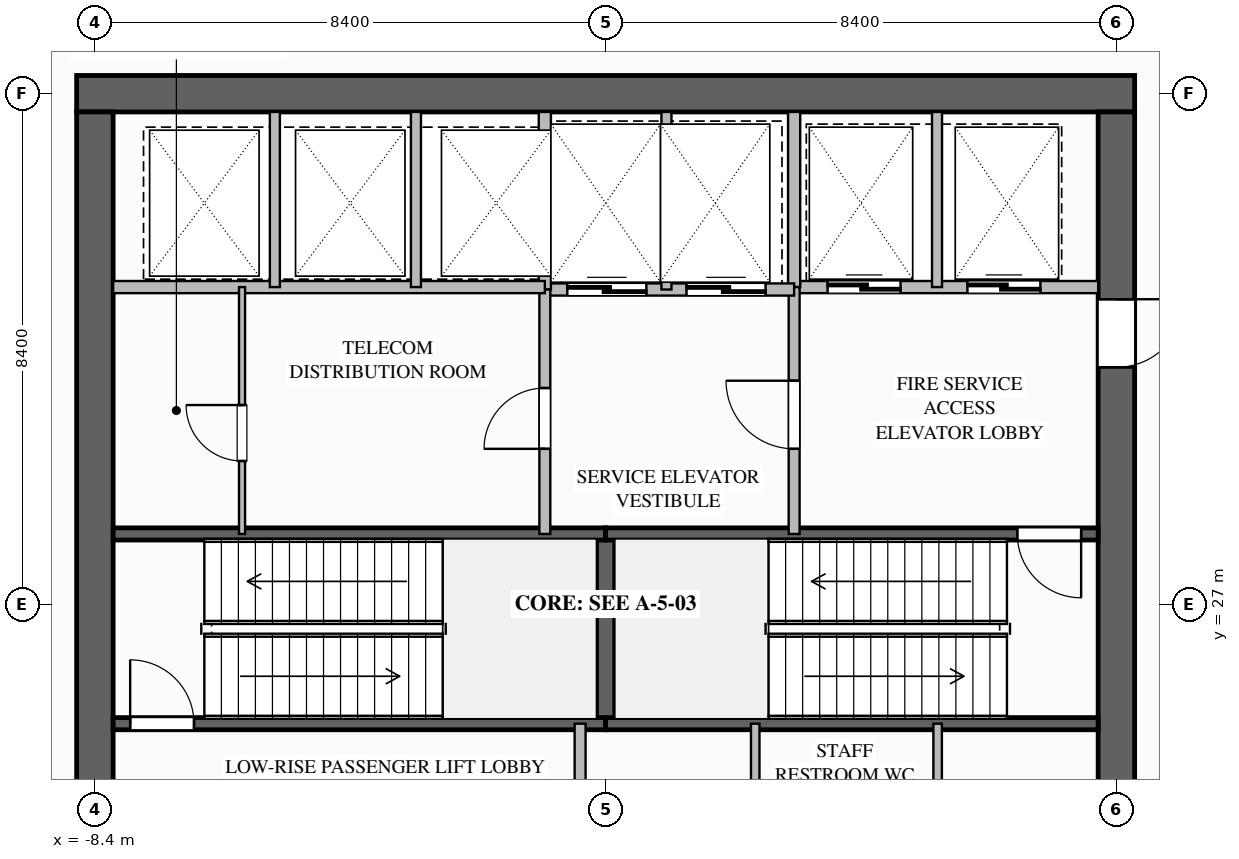
"""IFC4 building model, lengths in metres.
Left out: names, types, materials, properties, quantities, classifications, styles, units other than length and angle.
Written with IfcOpenShell. Run it as: python <this file> out.ifc"""

import sys

from ifc_helpers import new_model, si_unit, direction, frame, frame_2d, origin, place, context, subcontext, project, spatial, rectangle, extrude, element, fill, save


model = new_model("IFC4")
c1 = context("Model", 3, precision=1e-05, world=origin(), true_north=direction((0.0, 1.0)))
c2 = subcontext(c1, "Body", "Model", "MODEL_VIEW")
j1 = project(units=[si_unit("LENGTHUNIT", "METRE"), si_unit("PLANEANGLEUNIT", "RADIAN")], contexts=[c1])
p1 = place(None, origin())
s1 = spatial("IfcSite", under=j1, at=p1, CompositionType="ELEMENT")
p2 = place(p1, origin())
s2 = spatial("IfcBuilding", under=s1, at=p2, CompositionType="ELEMENT")
p3 = place(p2, frame((0.0, 0.0, 17.2)))
s3 = spatial("IfcBuildingStorey", under=s2, at=p3, CompositionType="ELEMENT", Elevation=17.2)
p4 = place(p3, frame((-8.7, 35.4, 0.0), z_axis=(0.0, 0.0, 1.0), x_axis=(1.0, 0.0, 0.0)))
e1 = element("IfcWall", 1, at=p4, inside=s3, PredefinedType="SHEAR", context=c2, shape_type="SweptSolid", body=[
    extrude(rectangle(XDim=17.4, YDim=0.6, at=frame_2d((8.7, 0.0))), origin(), (0.0, 0.0, 1.0), 5.2),
])
p5 = place(p3, frame((8.4, 35.1, 0.0), z_axis=(0.0, 0.0, 1.0), x_axis=(0.0, -1.0, 0.0)))
e2 = element("IfcWall", 2, at=p5, inside=s3, PredefinedType="SHEAR", context=c2, shape_type="SweptSolid", body=[
    extrude(rectangle(XDim=16.2, YDim=0.6, at=frame_2d((8.1, 0.0))), origin(), (0.0, 0.0, 1.0), 5.2),
])
p6 = place(p5, frame((3.08, 0.0, 0.0)))
e3 = element("IfcOpeningElement", 3, at=p6, cuts=e2, PredefinedType="OPENING", context=c2, shape_type="SweptSolid", body=[
    extrude(rectangle(XDim=1.12, YDim=2.1, at=frame_2d((0.56, 1.05))), frame((0.0, 0.31, 0.0), z_axis=(0.0, -1.0, 0.0), x_axis=(1.0, 0.0, 0.0)), (0.0, 0.0, 1.0), 0.62),
])
p7 = place(p3, frame((-8.4, 18.9, 0.0), z_axis=(0.0, 0.0, 1.0), x_axis=(0.0, 1.0, 0.0)))
e4 = element("IfcWall", 4, at=p7, inside=s3, PredefinedType="SHEAR", context=c2, shape_type="SweptSolid", body=[
    extrude(rectangle(XDim=16.2, YDim=0.6, at=frame_2d((8.1, 0.0))), origin(), (0.0, 0.0, 1.0), 5.2),
])
p8 = place(p7, frame((3.9, 0.0, 0.0)))
e5 = element("IfcOpeningElement", 5, at=p8, cuts=e4, PredefinedType="OPENING", context=c2, shape_type="SweptSolid", body=[
    extrude(rectangle(XDim=1.08, YDim=2.04, at=frame_2d((0.54, 1.02))), frame((0.0, 0.31, 0.0), z_axis=(0.0, -1.0, 0.0), x_axis=(1.0, 0.0, 0.0)), (0.0, 0.0, 1.0), 0.62),
])
p9 = place(p3, frame((0.0, 25.04, 0.0), z_axis=(0.0, 0.0, 1.0), x_axis=(0.0, 1.0, 0.0)))
e6 = element("IfcWall", 6, at=p9, inside=s3, PredefinedType="SOLIDWALL", context=c2, shape_type="SweptSolid", body=[
    extrude(rectangle(XDim=3.12, YDim=0.3, at=frame_2d((1.56, 0.0))), origin(), (0.0, 0.0, 1.0), 4.9),
])
p10 = place(p3, frame((-8.1, 25.04, 0.0), z_axis=(0.0, 0.0, 1.0), x_axis=(1.0, 0.0, 0.0)))
e7 = element("IfcWall", 7, at=p10, inside=s3, PredefinedType="SOLIDWALL", context=c2, shape_type="SweptSolid", body=[
    extrude(rectangle(XDim=8.1, YDim=0.2, at=frame_2d((4.05, 0.0))), origin(), (0.0, 0.0, 1.0), 4.9),
])
p11 = place(p10, frame((0.28, 0.0, 0.0)))
e8 = element("IfcOpeningElement", 8, at=p11, cuts=e7, PredefinedType="OPENING", context=c2, shape_type="SweptSolid", body=[
    extrude(rectangle(XDim=1.05, YDim=2.1, at=frame_2d((0.525, 1.05))), frame((0.0, 0.11, 0.0), z_axis=(0.0, -1.0, 0.0), x_axis=(1.0, 0.0, 0.0)), (0.0, 0.0, 1.0), 0.22),
])
for number, where, z_axis, x_axis in (
    (9, (-8.1, 28.16, 0.0), (0.0, 0.0, 1.0), (1.0, 0.0, 0.0)),
    (10, (0.0, 25.04, 0.0), (0.0, 0.0, 1.0), (1.0, 0.0, 0.0)),
):
    element("IfcWall", number, at=place(p3, frame(where, z_axis=z_axis, x_axis=x_axis)), inside=s3, PredefinedType="SOLIDWALL", context=c2, shape_type="SweptSolid", body=[
        extrude(rectangle(XDim=8.1, YDim=0.2, at=frame_2d((4.05, 0.0))), origin(), (0.0, 0.0, 1.0), 4.9),
    ])
p12 = place(p3, frame((8.1, 28.16, 0.0), z_axis=(0.0, 0.0, 1.0), x_axis=(-1.0, 0.0, 0.0)))
e11 = element("IfcWall", 11, at=p12, inside=s3, PredefinedType="SOLIDWALL", context=c2, shape_type="SweptSolid", body=[
    extrude(rectangle(XDim=8.1, YDim=0.2, at=frame_2d((4.05, 0.0))), origin(), (0.0, 0.0, 1.0), 4.9),
])
p13 = place(p12, frame((0.28, 0.0, 0.0)))
e12 = element("IfcOpeningElement", 12, at=p13, cuts=e11, PredefinedType="OPENING", context=c2, shape_type="SweptSolid", body=[
    extrude(rectangle(XDim=1.05, YDim=2.1, at=frame_2d((0.525, 1.05))), frame((0.0, 0.11, 0.0), z_axis=(0.0, -1.0, 0.0), x_axis=(1.0, 0.0, 0.0)), (0.0, 0.0, 1.0), 0.22),
])
p14 = place(p3, frame((3.1, 32.22, 0.0), z_axis=(0.0, 0.0, 1.0), x_axis=(1.0, 0.0, 0.0)))
e13 = element("IfcWall", 13, at=p14, inside=s3, PredefinedType="SOLIDWALL", context=c2, shape_type="SweptSolid", body=[
    extrude(rectangle(XDim=5.0, YDim=0.2, at=frame_2d((2.5, 0.0))), origin(), (0.0, 0.0, 1.0), 4.9),
])
p15 = place(p14, frame((0.55, 0.0, 0.0)))
e14 = element("IfcOpeningElement", 14, at=p15, cuts=e13, PredefinedType="OPENING", context=c2, shape_type="SweptSolid", body=[
    extrude(rectangle(XDim=1.2, YDim=2.2, at=frame_2d((0.6, 1.1))), frame((0.0, 0.11, 0.0), z_axis=(0.0, -1.0, 0.0), x_axis=(1.0, 0.0, 0.0)), (0.0, 0.0, 1.0), 0.22),
])
p16 = place(p14, frame((2.85, 0.0, 0.0)))
e15 = element("IfcOpeningElement", 15, at=p16, cuts=e13, PredefinedType="OPENING", context=c2, shape_type="SweptSolid", body=[
    extrude(rectangle(XDim=1.2, YDim=2.2, at=frame_2d((0.6, 1.1))), frame((0.0, 0.11, 0.0), z_axis=(0.0, -1.0, 0.0), x_axis=(1.0, 0.0, 0.0)), (0.0, 0.0, 1.0), 0.22),
])
p17 = place(p3, frame((3.1, 32.22, 0.0), z_axis=(0.0, 0.0, 1.0), x_axis=(0.0, 1.0, 0.0)))
e16 = element("IfcWall", 16, at=p17, inside=s3, PredefinedType="SOLIDWALL", context=c2, shape_type="SweptSolid", body=[
    extrude(rectangle(XDim=2.88, YDim=0.2, at=frame_2d((1.44, 0.0))), origin(), (0.0, 0.0, 1.0), 4.9),
])
p18 = place(p3, frame((5.45, 32.22, 0.0), z_axis=(0.0, 0.0, 1.0), x_axis=(0.0, 1.0, 0.0)))
e17 = element("IfcWall", 17, at=p18, inside=s3, PredefinedType="PARTITIONING", context=c2, shape_type="SweptSolid", body=[
    extrude(rectangle(XDim=2.88, YDim=0.165, at=frame_2d((1.44, 0.0))), origin(), (0.0, 0.0, 1.0), 4.9),
])
p19 = place(p3, frame((3.1, 28.16, 0.0), z_axis=(0.0, 0.0, 1.0), x_axis=(0.0, 1.0, 0.0)))
e18 = element("IfcWall", 18, at=p19, inside=s3, PredefinedType="SOLIDWALL", context=c2, shape_type="SweptSolid", body=[
    extrude(rectangle(XDim=4.06, YDim=0.18, at=frame_2d((2.03, 0.0))), origin(), (0.0, 0.0, 1.0), 4.9),
])
p20 = place(p19, frame((1.4, 0.0, 0.0)))
e19 = element("IfcOpeningElement", 19, at=p20, cuts=e18, PredefinedType="OPENING", context=c2, shape_type="SweptSolid", body=[
    extrude(rectangle(XDim=1.12, YDim=2.1, at=frame_2d((0.56, 1.05))), frame((0.0, 0.1, 0.0), z_axis=(0.0, -1.0, 0.0), x_axis=(1.0, 0.0, 0.0)), (0.0, 0.0, 1.0), 0.2),
])
p21 = place(p3, frame((-1.0, 32.18, 0.0), z_axis=(0.0, 0.0, 1.0), x_axis=(1.0, 0.0, 0.0)))
e20 = element("IfcWall", 20, at=p21, inside=s3, PredefinedType="SOLIDWALL", context=c2, shape_type="SweptSolid", body=[
    extrude(rectangle(XDim=4.1, YDim=0.2, at=frame_2d((2.05, 0.0))), origin(), (0.0, 0.0, 1.0), 4.9),
])
p22 = place(p21, frame((0.37, 0.0, 0.0)))
e21 = element("IfcOpeningElement", 21, at=p22, cuts=e20, PredefinedType="OPENING", context=c2, shape_type="SweptSolid", body=[
    extrude(rectangle(XDim=1.3, YDim=2.2, at=frame_2d((0.65, 1.1))), frame((0.0, 0.11, 0.0), z_axis=(0.0, -1.0, 0.0), x_axis=(1.0, 0.0, 0.0)), (0.0, 0.0, 1.0), 0.22),
])
p23 = place(p21, frame((2.33, 0.0, 0.0)))
e22 = element("IfcOpeningElement", 22, at=p23, cuts=e20, PredefinedType="OPENING", context=c2, shape_type="SweptSolid", body=[
    extrude(rectangle(XDim=1.3, YDim=2.2, at=frame_2d((0.65, 1.1))), frame((0.0, 0.11, 0.0), z_axis=(0.0, -1.0, 0.0), x_axis=(1.0, 0.0, 0.0)), (0.0, 0.0, 1.0), 0.22),
])
p24 = place(p3, frame((-1.0, 32.18, 0.0), z_axis=(0.0, 0.0, 1.0), x_axis=(0.0, 1.0, 0.0)))
e23 = element("IfcWall", 23, at=p24, inside=s3, PredefinedType="SOLIDWALL", context=c2, shape_type="SweptSolid", body=[
    extrude(rectangle(XDim=2.92, YDim=0.2, at=frame_2d((1.46, 0.0))), origin(), (0.0, 0.0, 1.0), 4.9),
])
p25 = place(p3, frame((1.0, 32.18, 0.0), z_axis=(0.0, 0.0, 1.0), x_axis=(0.0, 1.0, 0.0)))
e24 = element("IfcWall", 24, at=p25, inside=s3, PredefinedType="PARTITIONING", context=c2, shape_type="SweptSolid", body=[
    extrude(rectangle(XDim=2.92, YDim=0.165, at=frame_2d((1.46, 0.0))), origin(), (0.0, 0.0, 1.0), 4.9),
])
p26 = place(p3, frame((-1.0, 28.16, 0.0), z_axis=(0.0, 0.0, 1.0), x_axis=(0.0, 1.0, 0.0)))
e25 = element("IfcWall", 25, at=p26, inside=s3, PredefinedType="SOLIDWALL", context=c2, shape_type="SweptSolid", body=[
    extrude(rectangle(XDim=4.02, YDim=0.18, at=frame_2d((2.01, 0.0))), origin(), (0.0, 0.0, 1.0), 4.9),
])
p27 = place(p26, frame((1.4, 0.0, 0.0)))
e26 = element("IfcOpeningElement", 26, at=p27, cuts=e25, PredefinedType="OPENING", context=c2, shape_type="SweptSolid", body=[
    extrude(rectangle(XDim=1.0, YDim=2.1, at=frame_2d((0.5, 1.05))), frame((0.0, 0.1, 0.0), z_axis=(0.0, -1.0, 0.0), x_axis=(1.0, 0.0, 0.0)), (0.0, 0.0, 1.0), 0.2),
])
p28 = place(p3, frame((-8.1, 32.22, 0.0), z_axis=(0.0, 0.0, 1.0), x_axis=(1.0, 0.0, 0.0)))
e27 = element("IfcWall", 27, at=p28, inside=s3, PredefinedType="SOLIDWALL", context=c2, shape_type="SweptSolid", body=[
    extrude(rectangle(XDim=7.1, YDim=0.2, at=frame_2d((3.55, 0.0))), origin(), (0.0, 0.0, 1.0), 4.9),
])
for number, where, z_axis, x_axis in (
    (28, (-5.44, 32.22, 0.0), (0.0, 0.0, 1.0), (0.0, 1.0, 0.0)),
    (29, (-3.12, 32.22, 0.0), (0.0, 0.0, 1.0), (0.0, 1.0, 0.0)),
):
    element("IfcWall", number, at=place(p3, frame(where, z_axis=z_axis, x_axis=x_axis)), inside=s3, PredefinedType="PARTITIONING", context=c2, shape_type="SweptSolid", body=[
        extrude(rectangle(XDim=2.88, YDim=0.165, at=frame_2d((1.44, 0.0))), origin(), (0.0, 0.0, 1.0), 4.9),
    ])
p29 = place(p3, frame((-5.98, 28.16, 0.0), z_axis=(0.0, 0.0, 1.0), x_axis=(0.0, 1.0, 0.0)))
e30 = element("IfcWall", 30, at=p29, inside=s3, PredefinedType="PARTITIONING", context=c2, shape_type="SweptSolid", body=[
    extrude(rectangle(XDim=4.06, YDim=0.1, at=frame_2d((2.03, 0.0))), origin(), (0.0, 0.0, 1.0), 4.9),
])
p30 = place(p29, frame((1.2, 0.0, 0.0)))
e31 = element("IfcOpeningElement", 31, at=p30, cuts=e30, PredefinedType="OPENING", context=c2, shape_type="SweptSolid", body=[
    extrude(rectangle(XDim=0.92, YDim=2.1, at=frame_2d((0.46, 1.05))), frame((0.0, 0.06, 0.0), z_axis=(0.0, -1.0, 0.0), x_axis=(1.0, 0.0, 0.0)), (0.0, 0.0, 1.0), 0.12),
])
p31 = place(p3, frame((-0.42, 21.78, 0.0), z_axis=(0.0, 0.0, 1.0), x_axis=(0.0, 1.0, 0.0)))
e32 = element("IfcWall", 32, at=p31, inside=s3, PredefinedType="SOLIDWALL", context=c2, shape_type="SweptSolid", body=[
    extrude(rectangle(XDim=3.26, YDim=0.18, at=frame_2d((1.63, 0.0))), origin(), (0.0, 0.0, 1.0), 4.9),
])
p32 = place(p31, frame((1.1, 0.0, 0.0)))
e33 = element("IfcOpeningElement", 33, at=p32, cuts=e32, PredefinedType="OPENING", context=c2, shape_type="SweptSolid", body=[
    extrude(rectangle(XDim=1.0, YDim=2.1, at=frame_2d((0.5, 1.05))), frame((0.0, 0.1, 0.0), z_axis=(0.0, -1.0, 0.0), x_axis=(1.0, 0.0, 0.0)), (0.0, 0.0, 1.0), 0.2),
])
p33 = place(p3, frame((2.46, 21.78, 0.0), z_axis=(0.0, 0.0, 1.0), x_axis=(0.0, 1.0, 0.0)))
e34 = element("IfcWall", 34, at=p33, inside=s3, PredefinedType="PLUMBINGWALL", context=c2, shape_type="SweptSolid", body=[
    extrude(rectangle(XDim=3.26, YDim=0.14, at=frame_2d((1.63, 0.0))), origin(), (0.0, 0.0, 1.0), 4.9),
])
p34 = place(p33, frame((1.0, 0.0, 0.0)))
e35 = element("IfcOpeningElement", 35, at=p34, cuts=e34, PredefinedType="OPENING", context=c2, shape_type="SweptSolid", body=[
    extrude(rectangle(XDim=0.92, YDim=2.1, at=frame_2d((0.46, 1.05))), frame((0.0, 0.08, 0.0), z_axis=(0.0, -1.0, 0.0), x_axis=(1.0, 0.0, 0.0)), (0.0, 0.0, 1.0), 0.16),
])
p35 = place(p3, frame((5.46, 21.78, 0.0), z_axis=(0.0, 0.0, 1.0), x_axis=(0.0, 1.0, 0.0)))
e36 = element("IfcWall", 36, at=p35, inside=s3, PredefinedType="PLUMBINGWALL", context=c2, shape_type="SweptSolid", body=[
    extrude(rectangle(XDim=3.26, YDim=0.14, at=frame_2d((1.63, 0.0))), origin(), (0.0, 0.0, 1.0), 4.9),
])
p36 = place(p35, frame((1.0, 0.0, 0.0)))
e37 = element("IfcOpeningElement", 37, at=p36, cuts=e36, PredefinedType="OPENING", context=c2, shape_type="SweptSolid", body=[
    extrude(rectangle(XDim=0.92, YDim=2.1, at=frame_2d((0.46, 1.05))), frame((0.0, 0.08, 0.0), z_axis=(0.0, -1.0, 0.0), x_axis=(1.0, 0.0, 0.0)), (0.0, 0.0, 1.0), 0.16),
])
p37 = place(p11, origin())
e38 = element("IfcDoor", 38, at=p37, inside=s3, OperationType="SINGLE_SWING_LEFT", PredefinedType="DOOR", context=c2, shape_type="SweptSolid", body=[
    extrude(rectangle(XDim=1.05, YDim=2.1, at=frame_2d((0.525, 1.05))), frame((0.0, 0.025, 0.0), z_axis=(0.0, -1.0, 0.0), x_axis=(1.0, 0.0, 0.0)), (0.0, 0.0, 1.0), 0.05),
])
fill(e8, e38)
p38 = place(p13, origin())
e39 = element("IfcDoor", 39, at=p38, inside=s3, OperationType="SINGLE_SWING_LEFT", PredefinedType="DOOR", context=c2, shape_type="SweptSolid", body=[
    extrude(rectangle(XDim=1.05, YDim=2.1, at=frame_2d((0.525, 1.05))), frame((0.0, 0.025, 0.0), z_axis=(0.0, -1.0, 0.0), x_axis=(1.0, 0.0, 0.0)), (0.0, 0.0, 1.0), 0.05),
])
fill(e12, e39)
p39 = place(p15, origin())
e40 = element("IfcDoor", 40, at=p39, inside=s3, OperationType="SLIDING_TO_LEFT", PredefinedType="DOOR", context=c2, shape_type="SweptSolid", body=[
    extrude(rectangle(XDim=1.2, YDim=2.2, at=frame_2d((0.6, 1.1))), frame((0.0, 0.025, 0.0), z_axis=(0.0, -1.0, 0.0), x_axis=(1.0, 0.0, 0.0)), (0.0, 0.0, 1.0), 0.05),
])
fill(e14, e40)
p40 = place(p16, origin())
e41 = element("IfcDoor", 41, at=p40, inside=s3, OperationType="SLIDING_TO_LEFT", PredefinedType="DOOR", context=c2, shape_type="SweptSolid", body=[
    extrude(rectangle(XDim=1.2, YDim=2.2, at=frame_2d((0.6, 1.1))), frame((0.0, 0.025, 0.0), z_axis=(0.0, -1.0, 0.0), x_axis=(1.0, 0.0, 0.0)), (0.0, 0.0, 1.0), 0.05),
])
fill(e15, e41)
p41 = place(p20, origin())
e42 = element("IfcDoor", 42, at=p41, inside=s3, OperationType="SINGLE_SWING_RIGHT", PredefinedType="DOOR", context=c2, shape_type="SweptSolid", body=[
    extrude(rectangle(XDim=1.12, YDim=2.1, at=frame_2d((0.56, 1.05))), frame((0.0, 0.025, 0.0), z_axis=(0.0, -1.0, 0.0), x_axis=(1.0, 0.0, 0.0)), (0.0, 0.0, 1.0), 0.05),
])
fill(e19, e42)
p42 = place(p6, origin())
e43 = element("IfcDoor", 43, at=p42, inside=s3, OperationType="SINGLE_SWING_LEFT", PredefinedType="DOOR", context=c2, shape_type="SweptSolid", body=[
    extrude(rectangle(XDim=1.12, YDim=2.1, at=frame_2d((0.56, 1.05))), frame((0.0, 0.025, 0.0), z_axis=(0.0, -1.0, 0.0), x_axis=(1.0, 0.0, 0.0)), (0.0, 0.0, 1.0), 0.05),
])
fill(e3, e43)
p43 = place(p22, origin())
e44 = element("IfcDoor", 44, at=p43, inside=s3, OperationType="SLIDING_TO_LEFT", PredefinedType="DOOR", context=c2, shape_type="SweptSolid", body=[
    extrude(rectangle(XDim=1.3, YDim=2.2, at=frame_2d((0.65, 1.1))), frame((0.0, 0.025, 0.0), z_axis=(0.0, -1.0, 0.0), x_axis=(1.0, 0.0, 0.0)), (0.0, 0.0, 1.0), 0.05),
])
fill(e21, e44)
p44 = place(p23, origin())
e45 = element("IfcDoor", 45, at=p44, inside=s3, OperationType="SLIDING_TO_LEFT", PredefinedType="DOOR", context=c2, shape_type="SweptSolid", body=[
    extrude(rectangle(XDim=1.3, YDim=2.2, at=frame_2d((0.65, 1.1))), frame((0.0, 0.025, 0.0), z_axis=(0.0, -1.0, 0.0), x_axis=(1.0, 0.0, 0.0)), (0.0, 0.0, 1.0), 0.05),
])
fill(e22, e45)
p45 = place(p27, origin())
e46 = element("IfcDoor", 46, at=p45, inside=s3, OperationType="SINGLE_SWING_LEFT", PredefinedType="DOOR", context=c2, shape_type="SweptSolid", body=[
    extrude(rectangle(XDim=1.0, YDim=2.1, at=frame_2d((0.5, 1.05))), frame((0.0, 0.025, 0.0), z_axis=(0.0, -1.0, 0.0), x_axis=(1.0, 0.0, 0.0)), (0.0, 0.0, 1.0), 0.05),
])
fill(e26, e46)
p46 = place(p30, origin())
e47 = element("IfcDoor", 47, at=p46, inside=s3, OperationType="SINGLE_SWING_RIGHT", PredefinedType="DOOR", context=c2, shape_type="SweptSolid", body=[
    extrude(rectangle(XDim=0.92, YDim=2.1, at=frame_2d((0.46, 1.05))), frame((0.0, 0.025, 0.0), z_axis=(0.0, -1.0, 0.0), x_axis=(1.0, 0.0, 0.0)), (0.0, 0.0, 1.0), 0.05),
])
fill(e31, e47)
save(model, sys.argv[1])
